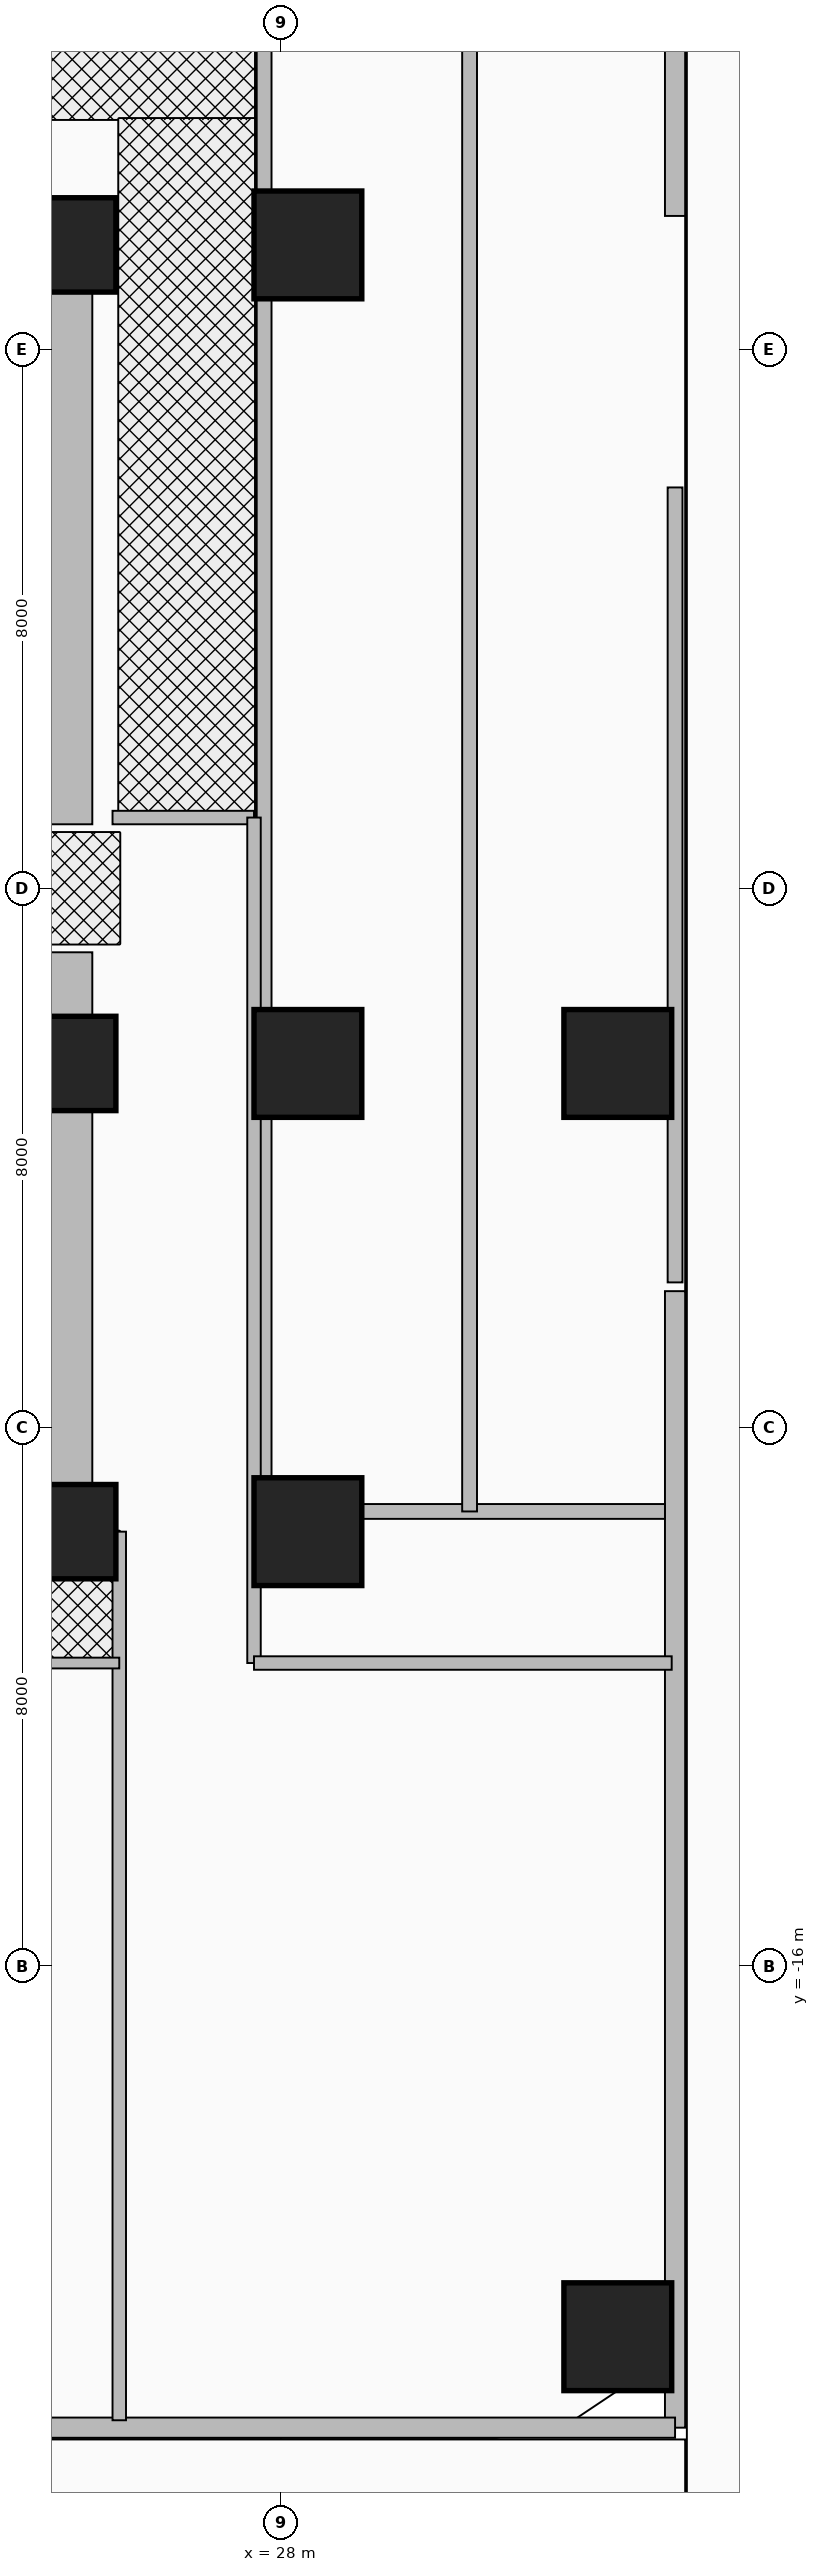
"""IFC4 building model, lengths in metres.
Left out: names, types, materials, properties, quantities, classifications, styles, units other than length and angle.
Written with IfcOpenShell. Run it as: python <this file> out.ifc"""

import sys

from ifc_helpers import new_model, si_unit, direction, frame, frame_2d, origin, origin_2d, place, context, subcontext, project, spatial, rectangle, extrude, source, transform, mapped, element, fill, save


model = new_model("IFC4")
c1 = context("Model", 3, precision=1e-05, world=origin(), true_north=direction((0.0, 1.0)))
c2 = subcontext(c1, "Body", "Model", "MODEL_VIEW")
j1 = project(units=[si_unit("LENGTHUNIT", "METRE"), si_unit("PLANEANGLEUNIT", "RADIAN")], contexts=[c1])
p1 = place(None, origin())
s1 = spatial("IfcSite", under=j1, at=p1, CompositionType="ELEMENT")
p2 = place(p1, origin())
s2 = spatial("IfcBuilding", under=s1, at=p2, CompositionType="ELEMENT")
p3 = place(p2, origin())
s3 = spatial("IfcBuildingStorey", under=s2, at=p3, CompositionType="ELEMENT", Elevation=0.0)
for number, where, z_axis, x_axis in (
    (1, (24.85, -9.9, 0.0), (0.0, 0.0, 1.0), (0.0, 1.0, 0.0)),
    (2, (24.85, 0.95, 0.0), (0.0, 0.0, 1.0), (0.0, 1.0, 0.0)),
):
    element("IfcWall", number, at=place(p3, frame(where, z_axis=z_axis, x_axis=x_axis)), inside=s3, PredefinedType="SHEAR", context=c2, shape_type="SweptSolid", body=[
        extrude(rectangle(XDim=8.95, YDim=0.7, at=frame_2d((4.475, 0.0))), origin(), (0.0, 0.0, 1.0), 4.92),
    ])
for number, where, z_axis, x_axis in (
    (3, (15.85, 9.55, 0.0), (0.0, 0.0, 1.0), (1.0, 0.0, 0.0)),
    (4, (15.85, -9.55, 0.0), (0.0, 0.0, 1.0), (1.0, 0.0, 0.0)),
):
    element("IfcWall", number, at=place(p3, frame(where, z_axis=z_axis, x_axis=x_axis)), inside=s3, PredefinedType="SHEAR", context=c2, shape_type="SweptSolid", body=[
        extrude(rectangle(XDim=9.0, YDim=0.7, at=frame_2d((4.5, 0.0))), origin(), (0.0, 0.0, 1.0), 4.92),
    ])
m1 = source(origin(), c2, "Body", "SweptSolid", [
    extrude(rectangle(XDim=1.4, YDim=1.4, at=origin_2d()), origin(), (0.0, 0.0, 1.0), 5.2),
])
p4 = place(p3, frame((24.85, -9.55, 0.0), z_axis=(0.0, 0.0, 1.0), x_axis=(1.0, 0.0, 0.0)))
e5 = element("IfcColumn", 5, at=p4, inside=s3, PredefinedType="COLUMN", context=c2, shape_type="MappedRepresentation", body=[
    mapped(m1, transform((0.0, 0.0, 0.0), x_axis=(1.0, 0.0, 0.0), y_axis=(0.0, 1.0, 0.0), z_axis=(0.0, 0.0, 1.0), scale=1.0)),
])
m2 = source(origin(), c2, "Body", "SweptSolid", [
    extrude(rectangle(XDim=1.6, YDim=1.6, at=origin_2d()), origin(), (0.0, 0.0, 1.0), 5.2),
])
p5 = place(p3, frame((28.4, -9.55, 0.0), z_axis=(0.0, 0.0, 1.0), x_axis=(1.0, 0.0, 0.0)))
e6 = element("IfcColumn", 6, at=p5, inside=s3, PredefinedType="COLUMN", context=c2, shape_type="MappedRepresentation", body=[
    mapped(m2, transform((0.0, 0.0, 0.0), x_axis=(1.0, 0.0, 0.0), y_axis=(0.0, 1.0, 0.0), z_axis=(0.0, 0.0, 1.0), scale=1.0)),
])
p6 = place(p3, frame((24.85, -2.6, 0.0), z_axis=(0.0, 0.0, 1.0), x_axis=(1.0, 0.0, 0.0)))
e7 = element("IfcColumn", 7, at=p6, inside=s3, PredefinedType="COLUMN", context=c2, shape_type="MappedRepresentation", body=[
    mapped(m1, transform((0.0, 0.0, 0.0), x_axis=(1.0, 0.0, 0.0), y_axis=(0.0, 1.0, 0.0), z_axis=(0.0, 0.0, 1.0), scale=1.0)),
])
p7 = place(p3, frame((28.4, -2.6, 0.0), z_axis=(0.0, 0.0, 1.0), x_axis=(1.0, 0.0, 0.0)))
e8 = element("IfcColumn", 8, at=p7, inside=s3, PredefinedType="COLUMN", context=c2, shape_type="MappedRepresentation", body=[
    mapped(m2, transform((0.0, 0.0, 0.0), x_axis=(1.0, 0.0, 0.0), y_axis=(0.0, 1.0, 0.0), z_axis=(0.0, 0.0, 1.0), scale=1.0)),
])
p8 = place(p3, frame((24.85, 9.55, 0.0), z_axis=(0.0, 0.0, 1.0), x_axis=(1.0, 0.0, 0.0)))
e9 = element("IfcColumn", 9, at=p8, inside=s3, PredefinedType="COLUMN", context=c2, shape_type="MappedRepresentation", body=[
    mapped(m1, transform((0.0, 0.0, 0.0), x_axis=(1.0, 0.0, 0.0), y_axis=(0.0, 1.0, 0.0), z_axis=(0.0, 0.0, 1.0), scale=1.0)),
])
for number, where, z_axis, x_axis in (
    (10, (28.4, 9.55, 0.0), (0.0, 0.0, 1.0), (1.0, 0.0, 0.0)),
    (11, (33.0, -2.6, 0.0), (0.0, 0.0, 1.0), (1.0, 0.0, 0.0)),
    (12, (33.0, -21.5, 0.0), (0.0, 0.0, 1.0), (1.0, 0.0, 0.0)),
):
    element("IfcColumn", number, at=place(p3, frame(where, z_axis=z_axis, x_axis=x_axis)), inside=s3, PredefinedType="COLUMN", context=c2, shape_type="MappedRepresentation", body=[
        mapped(m2, transform((0.0, 0.0, 0.0), x_axis=(1.0, 0.0, 0.0), y_axis=(0.0, 1.0, 0.0), z_axis=(0.0, 0.0, 1.0), scale=1.0)),
    ])
p9 = place(p3, frame((33.85, -22.85, 0.0), z_axis=(0.0, 0.0, 1.0), x_axis=(0.0, 1.0, 0.0)))
e13 = element("IfcWall", 13, at=p9, inside=s3, PredefinedType="SOLIDWALL", context=c2, shape_type="SweptSolid", body=[
    extrude(rectangle(XDim=16.87, YDim=0.3, at=frame_2d((8.435, 0.0))), origin(), (0.0, 0.0, 1.0), 4.92),
])
p10 = place(p9, frame((11.2, 0.0, 0.0)))
e14 = element("IfcOpeningElement", 14, at=p10, cuts=e13, PredefinedType="OPENING", context=c2, shape_type="SweptSolid", body=[
    extrude(rectangle(XDim=1.8, YDim=2.2, at=frame_2d((0.9, 1.1))), frame((0.0, 0.165, 0.0), z_axis=(0.0, -1.0, 0.0), x_axis=(1.0, 0.0, 0.0)), (0.0, 0.0, 1.0), 0.33),
])
p11 = place(p3, frame((33.85, 9.98, 0.0), z_axis=(0.0, 0.0, 1.0), x_axis=(0.0, 1.0, 0.0)))
e15 = element("IfcWall", 15, at=p11, inside=s3, PredefinedType="SOLIDWALL", context=c2, shape_type="SweptSolid", body=[
    extrude(rectangle(XDim=12.87, YDim=0.3, at=frame_2d((6.435, 0.0))), origin(), (0.0, 0.0, 1.0), 4.92),
])
p12 = place(p11, frame((4.1, 0.0, 0.0)))
e16 = element("IfcOpeningElement", 16, at=p12, cuts=e15, PredefinedType="OPENING", context=c2, shape_type="SweptSolid", body=[
    extrude(rectangle(XDim=3.6, YDim=2.5, at=frame_2d((1.8, 1.25))), frame((0.0, 0.165, 0.0), z_axis=(0.0, -1.0, 0.0), x_axis=(1.0, 0.0, 0.0)), (0.0, 0.0, 1.0), 0.33),
])
p13 = place(p3, frame((12.15, -22.85, 0.0), z_axis=(0.0, 0.0, 1.0), x_axis=(1.0, 0.0, 0.0)))
e17 = element("IfcWall", 17, at=p13, inside=s3, PredefinedType="SOLIDWALL", context=c2, shape_type="SweptSolid", body=[
    extrude(rectangle(XDim=21.7, YDim=0.3, at=frame_2d((10.85, 0.0))), origin(), (0.0, 0.0, 1.0), 4.92),
])
p14 = place(p13, frame((15.55, 0.0, 0.0)))
e18 = element("IfcOpeningElement", 18, at=p14, cuts=e17, PredefinedType="OPENING", context=c2, shape_type="SweptSolid", body=[
    extrude(rectangle(XDim=1.8, YDim=2.2, at=frame_2d((0.9, 1.1))), frame((0.0, 0.165, 0.0), z_axis=(0.0, -1.0, 0.0), x_axis=(1.0, 0.0, 0.0)), (0.0, 0.0, 1.0), 0.33),
])
p15 = place(p3, frame((27.75, -9.25, 0.0), z_axis=(0.0, 0.0, 1.0), x_axis=(0.0, 1.0, 0.0)))
e19 = element("IfcWall", 19, at=p15, inside=s3, PredefinedType="PARAPET", context=c2, shape_type="SweptSolid", body=[
    extrude(rectangle(XDim=23.6, YDim=0.22, at=frame_2d((11.8, 0.0))), origin(), (0.0, 0.0, 1.0), 1.35),
])
p16 = place(p3, frame((33.85, -5.85, 0.0), z_axis=(0.0, 0.0, 1.0), x_axis=(0.0, 1.0, 0.0)))
e20 = element("IfcWall", 20, at=p16, inside=s3, PredefinedType="PARAPET", context=c2, shape_type="SweptSolid", body=[
    extrude(rectangle(XDim=11.8, YDim=0.22, at=frame_2d((5.9, 0.0))), origin(), (0.0, 0.0, 1.0), 1.35),
])
p17 = place(p3, frame((27.75, -9.25, 0.0), z_axis=(0.0, 0.0, 1.0), x_axis=(1.0, 0.0, 0.0)))
e21 = element("IfcWall", 21, at=p17, inside=s3, PredefinedType="PARAPET", context=c2, shape_type="SweptSolid", body=[
    extrude(rectangle(XDim=5.95, YDim=0.22, at=frame_2d((2.975, 0.0))), origin(), (0.0, 0.0, 1.0), 1.35),
])
p18 = place(p3, frame((30.8, -9.25, 0.0), z_axis=(0.0, 0.0, 1.0), x_axis=(0.0, 1.0, 0.0)))
e22 = element("IfcWall", 22, at=p18, inside=s3, PredefinedType="PARAPET", context=c2, shape_type="SweptSolid", body=[
    extrude(rectangle(XDim=23.2, YDim=0.22, at=frame_2d((11.6, 0.0))), origin(), (0.0, 0.0, 1.0), 1.35),
])
p19 = place(p3, frame((25.5, 1.05, 0.0), z_axis=(0.0, 0.0, 1.0), x_axis=(1.0, 0.0, 0.0)))
e23 = element("IfcWall", 23, at=p19, inside=s3, PredefinedType="PARTITIONING", context=c2, shape_type="SweptSolid", body=[
    extrude(rectangle(XDim=2.1, YDim=0.2, at=frame_2d((1.05, 0.0))), origin(), (0.0, 0.0, 1.0), 4.92),
])
p20 = place(p19, frame((0.5, 0.0, 0.0)))
e24 = element("IfcOpeningElement", 24, at=p20, cuts=e23, PredefinedType="OPENING", context=c2, shape_type="SweptSolid", body=[
    extrude(rectangle(XDim=1.05, YDim=2.15, at=frame_2d((0.525, 1.075))), frame((0.0, 0.115, 0.0), z_axis=(0.0, -1.0, 0.0), x_axis=(1.0, 0.0, 0.0)), (0.0, 0.0, 1.0), 0.23),
])
p21 = place(p3, frame((25.6, -22.74, 0.0), z_axis=(0.0, 0.0, 1.0), x_axis=(0.0, 1.0, 0.0)))
e25 = element("IfcWall", 25, at=p21, inside=s3, PredefinedType="PARTITIONING", context=c2, shape_type="SweptSolid", body=[
    extrude(rectangle(XDim=13.19, YDim=0.2, at=frame_2d((6.595, 0.0))), origin(), (0.0, 0.0, 1.0), 3.957),
])
p22 = place(p3, frame((27.6, -11.5, 0.0), z_axis=(0.0, 0.0, 1.0), x_axis=(0.0, 1.0, 0.0)))
e26 = element("IfcWall", 26, at=p22, inside=s3, PredefinedType="PARTITIONING", context=c2, shape_type="SweptSolid", body=[
    extrude(rectangle(XDim=12.55, YDim=0.2, at=frame_2d((6.275, 0.0))), origin(), (0.0, 0.0, 1.0), 3.957),
])
p23 = place(p3, frame((27.6, -11.5, 0.0), z_axis=(0.0, 0.0, 1.0), x_axis=(1.0, 0.0, 0.0)))
e27 = element("IfcWall", 27, at=p23, inside=s3, PredefinedType="PARTITIONING", context=c2, shape_type="SweptSolid", body=[
    extrude(rectangle(XDim=6.2, YDim=0.2, at=frame_2d((3.1, 0.0))), origin(), (0.0, 0.0, 1.0), 4.356),
])
p24 = place(p3, frame((13.2, -11.5, 0.0), z_axis=(0.0, 0.0, 1.0), x_axis=(1.0, 0.0, 0.0)))
e28 = element("IfcWall", 28, at=p24, inside=s3, PredefinedType="PARTITIONING", context=c2, shape_type="SweptSolid", body=[
    extrude(rectangle(XDim=12.4, YDim=0.16, at=frame_2d((6.2, 0.0))), origin(), (0.0, 0.0, 1.0), 4.92),
])
p25 = place(p24, frame((4.5, 0.0, 0.0)))
e29 = element("IfcOpeningElement", 29, at=p25, cuts=e28, PredefinedType="OPENING", context=c2, shape_type="SweptSolid", body=[
    extrude(rectangle(XDim=1.4, YDim=2.15, at=frame_2d((0.7, 1.075))), frame((0.0, 0.095, 0.0), z_axis=(0.0, -1.0, 0.0), x_axis=(1.0, 0.0, 0.0)), (0.0, 0.0, 1.0), 0.19),
])
p26 = place(p14, frame((1.8, 0.0, 0.0), z_axis=(0.0, 0.0, 1.0), x_axis=(-1.0, 0.0, 0.0)))
e30 = element("IfcDoor", 30, at=p26, inside=s3, OperationType="SINGLE_SWING_LEFT", PredefinedType="DOOR", context=c2, shape_type="SweptSolid", body=[
    extrude(rectangle(XDim=1.8, YDim=2.2, at=frame_2d((0.9, 1.1))), frame((0.0, 0.025, 0.0), z_axis=(0.0, -1.0, 0.0), x_axis=(1.0, 0.0, 0.0)), (0.0, 0.0, 1.0), 0.05),
])
fill(e18, e30)
p27 = place(p10, frame((1.8, 0.0, 0.0), z_axis=(0.0, 0.0, 1.0), x_axis=(-1.0, 0.0, 0.0)))
e31 = element("IfcDoor", 31, at=p27, inside=s3, OperationType="SINGLE_SWING_LEFT", PredefinedType="DOOR", context=c2, shape_type="SweptSolid", body=[
    extrude(rectangle(XDim=1.8, YDim=2.2, at=frame_2d((0.9, 1.1))), frame((0.0, 0.025, 0.0), z_axis=(0.0, -1.0, 0.0), x_axis=(1.0, 0.0, 0.0)), (0.0, 0.0, 1.0), 0.05),
])
fill(e14, e31)
p28 = place(p20, frame((1.05, 0.0, 0.0), z_axis=(0.0, 0.0, 1.0), x_axis=(-1.0, 0.0, 0.0)))
e32 = element("IfcDoor", 32, at=p28, inside=s3, OperationType="SINGLE_SWING_RIGHT", PredefinedType="DOOR", context=c2, shape_type="SweptSolid", body=[
    extrude(rectangle(XDim=1.05, YDim=2.15, at=frame_2d((0.525, 1.075))), frame((0.0, 0.025, 0.0), z_axis=(0.0, -1.0, 0.0), x_axis=(1.0, 0.0, 0.0)), (0.0, 0.0, 1.0), 0.05),
])
fill(e24, e32)
save(model, sys.argv[1])
